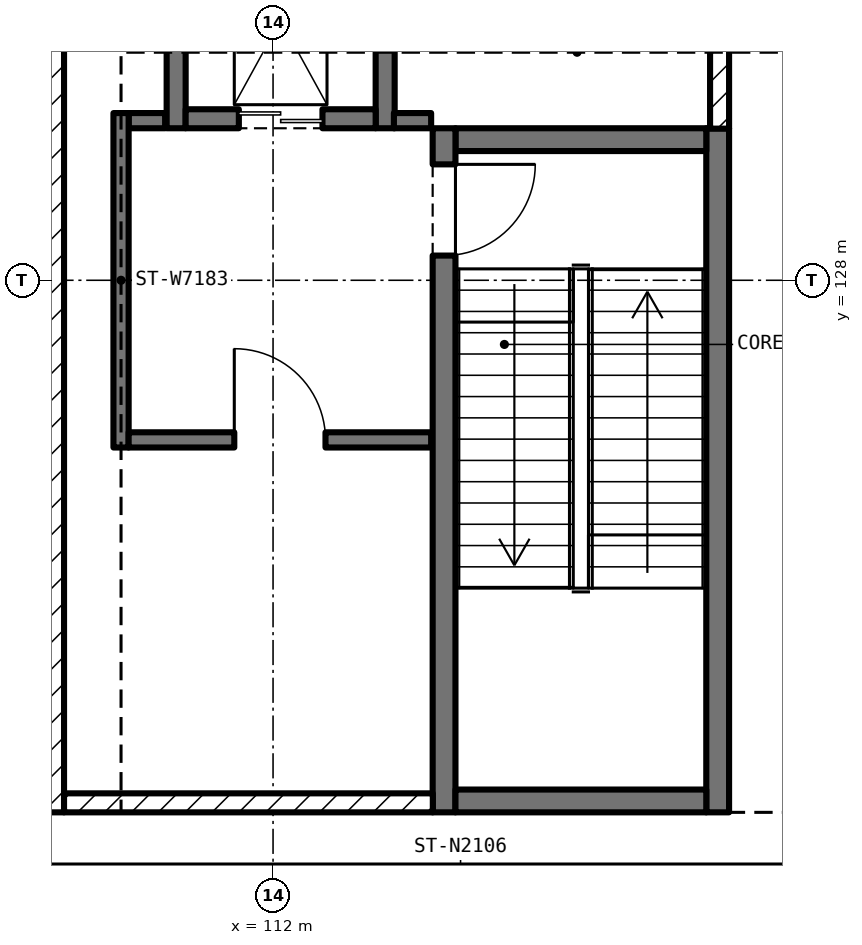
"""IFC4 building model, lengths in metres.
Left out: names, types, materials, properties, quantities, classifications, styles, units other than length and angle.
Written with IfcOpenShell. Run it as: python <this file> out.ifc"""

import sys

from ifc_helpers import new_model, si_unit, direction, frame, frame_2d, origin, place, context, subcontext, project, spatial, rectangle, extrude, element, fill, save


model = new_model("IFC4")
c1 = context("Model", 3, precision=1e-05, world=origin(), true_north=direction((0.0, 1.0)))
c2 = subcontext(c1, "Body", "Model", "MODEL_VIEW")
j1 = project(units=[si_unit("LENGTHUNIT", "METRE"), si_unit("PLANEANGLEUNIT", "RADIAN")], contexts=[c1])
p1 = place(None, origin())
s1 = spatial("IfcSite", under=j1, at=p1, CompositionType="ELEMENT")
p2 = place(p1, origin())
s2 = spatial("IfcBuilding", under=s1, at=p2, CompositionType="ELEMENT")
p3 = place(p2, frame((0.0, 0.0, 17.0)))
s3 = spatial("IfcBuildingStorey", under=s2, at=p3, CompositionType="ELEMENT", Elevation=17.0)
p4 = place(p3, frame((117.85, 121.0, 0.0), z_axis=(0.0, 0.0, 1.0), x_axis=(0.0, 1.0, 0.0)))
e1 = element("IfcWall", 1, at=p4, inside=s3, PredefinedType="SOLIDWALL", context=c2, shape_type="SweptSolid", body=[
    extrude(rectangle(XDim=9.0, YDim=0.3, at=frame_2d((4.5, 0.0))), origin(), (0.0, 0.0, 1.0), 5.5),
])
p5 = place(p3, frame((117.7, 129.85, 0.0), z_axis=(0.0, 0.0, 1.0), x_axis=(-1.0, 0.0, 0.0)))
e2 = element("IfcWall", 2, at=p5, inside=s3, PredefinedType="SOLIDWALL", context=c2, shape_type="SweptSolid", body=[
    extrude(rectangle(XDim=3.3, YDim=0.3, at=frame_2d((1.65, 0.0))), origin(), (0.0, 0.0, 1.0), 5.5),
])
p6 = place(p3, frame((114.25, 130.0, 0.0), z_axis=(0.0, 0.0, 1.0), x_axis=(0.0, -1.0, 0.0)))
e3 = element("IfcWall", 3, at=p6, inside=s3, PredefinedType="SOLIDWALL", context=c2, shape_type="SweptSolid", body=[
    extrude(rectangle(XDim=9.0, YDim=0.3, at=frame_2d((4.5, 0.0))), origin(), (0.0, 0.0, 1.0), 5.5),
])
p7 = place(p6, frame((0.475, 0.0, 0.0)))
e4 = element("IfcOpeningElement", 4, at=p7, cuts=e3, PredefinedType="OPENING", context=c2, shape_type="SweptSolid", body=[
    extrude(rectangle(XDim=1.2, YDim=2.1, at=frame_2d((0.6, 1.05))), frame((0.0, 0.162, 0.0), z_axis=(0.0, -1.0, 0.0), x_axis=(1.0, 0.0, 0.0)), (0.0, 0.0, 1.0), 0.324),
])
p8 = place(p3, frame((114.4, 121.15, 0.0), z_axis=(0.0, 0.0, 1.0), x_axis=(1.0, 0.0, 0.0)))
e5 = element("IfcWall", 5, at=p8, inside=s3, PredefinedType="SOLIDWALL", context=c2, shape_type="SweptSolid", body=[
    extrude(rectangle(XDim=3.3, YDim=0.3, at=frame_2d((1.65, 0.0))), origin(), (0.0, 0.0, 1.0), 5.5),
])
for number, where, z_axis, x_axis in (
    (6, (113.475, 130.0, 0.0), (0.0, 0.0, 1.0), (0.0, 1.0, 0.0)),
    (7, (110.725, 134.0, 0.0), (0.0, 0.0, 1.0), (0.0, -1.0, 0.0)),
):
    element("IfcWall", number, at=place(p3, frame(where, z_axis=z_axis, x_axis=x_axis)), inside=s3, PredefinedType="SOLIDWALL", context=c2, shape_type="SweptSolid", body=[
        extrude(rectangle(XDim=4.0, YDim=0.25, at=frame_2d((2.0, 0.0))), origin(), (0.0, 0.0, 1.0), 5.5),
    ])
p9 = place(p3, frame((110.85, 130.125, 0.0), z_axis=(0.0, 0.0, 1.0), x_axis=(1.0, 0.0, 0.0)))
e8 = element("IfcWall", 8, at=p9, inside=s3, PredefinedType="SOLIDWALL", context=c2, shape_type="SweptSolid", body=[
    extrude(rectangle(XDim=2.5, YDim=0.25, at=frame_2d((1.25, 0.0))), origin(), (0.0, 0.0, 1.0), 5.5),
])
p10 = place(p9, frame((0.7, 0.0, 0.0)))
e9 = element("IfcOpeningElement", 9, at=p10, cuts=e8, PredefinedType="OPENING", context=c2, shape_type="SweptSolid", body=[
    extrude(rectangle(XDim=1.1, YDim=2.1, at=frame_2d((0.55, 1.05))), frame((0.0, 0.137, 0.0), z_axis=(0.0, -1.0, 0.0), x_axis=(1.0, 0.0, 0.0)), (0.0, 0.0, 1.0), 0.274),
])
p11 = place(p3, frame((114.08, 130.1, 0.0), z_axis=(0.0, 0.0, 1.0), x_axis=(-1.0, 0.0, 0.0)))
e10 = element("IfcWall", 10, at=p11, inside=s3, PredefinedType="PARTITIONING", context=c2, shape_type="SweptSolid", body=[
    extrude(rectangle(XDim=0.49, YDim=0.2, at=frame_2d((0.245, 0.0))), origin(), (0.0, 0.0, 1.0), 5.28),
])
p12 = place(p3, frame((110.58, 130.1, 0.0), z_axis=(0.0, 0.0, 1.0), x_axis=(-1.0, 0.0, 0.0)))
e11 = element("IfcWall", 11, at=p12, inside=s3, PredefinedType="PARTITIONING", context=c2, shape_type="SweptSolid", body=[
    extrude(rectangle(XDim=0.48, YDim=0.2, at=frame_2d((0.24, 0.0))), origin(), (0.0, 0.0, 1.0), 5.28),
])
p13 = place(p3, frame((110.0, 130.2, 0.0), z_axis=(0.0, 0.0, 1.0), x_axis=(0.0, -1.0, 0.0)))
e12 = element("IfcWall", 12, at=p13, inside=s3, PredefinedType="PARTITIONING", context=c2, shape_type="SweptSolid", body=[
    extrude(rectangle(XDim=4.4, YDim=0.2, at=frame_2d((2.2, 0.0))), origin(), (0.0, 0.0, 1.0), 5.28),
])
p14 = place(p3, frame((110.1, 125.9, 0.0), z_axis=(0.0, 0.0, 1.0), x_axis=(1.0, 0.0, 0.0)))
e13 = element("IfcWall", 13, at=p14, inside=s3, PredefinedType="PARTITIONING", context=c2, shape_type="SweptSolid", body=[
    extrude(rectangle(XDim=3.98, YDim=0.2, at=frame_2d((1.99, 0.0))), origin(), (0.0, 0.0, 1.0), 5.28),
])
p15 = place(p14, frame((1.39, 0.0, 0.0)))
e14 = element("IfcOpeningElement", 14, at=p15, cuts=e13, PredefinedType="OPENING", context=c2, shape_type="SweptSolid", body=[
    extrude(rectangle(XDim=1.2, YDim=2.1, at=frame_2d((0.6, 1.05))), frame((0.0, 0.112, 0.0), z_axis=(0.0, -1.0, 0.0), x_axis=(1.0, 0.0, 0.0)), (0.0, 0.0, 1.0), 0.224),
])
p16 = place(p3, frame((117.875, 129.995, 0.0), z_axis=(0.0, 0.0, 1.0), x_axis=(0.0, 1.0, 0.0)))
e15 = element("IfcWall", 15, at=p16, inside=s3, PredefinedType="SOLIDWALL", context=c2, shape_type="SweptSolid", body=[
    extrude(rectangle(XDim=5.005, YDim=0.25, at=frame_2d((2.502, 0.0))), origin(), (0.0, 0.0, 1.0), 5.28),
])
p17 = place(p16, frame((1.43, 0.0, 2.6)))
e16 = element("IfcOpeningElement", 16, at=p17, cuts=e15, PredefinedType="OPENING", context=c2, shape_type="SweptSolid", body=[
    extrude(rectangle(XDim=2.4, YDim=1.2, at=frame_2d((1.2, 0.6))), frame((0.0, 0.137, 0.0), z_axis=(0.0, -1.0, 0.0), x_axis=(1.0, 0.0, 0.0)), (0.0, 0.0, 1.0), 0.274),
])
p18 = place(p3, frame((109.125, 134.75, 0.0), z_axis=(0.0, 0.0, 1.0), x_axis=(0.0, -1.0, 0.0)))
e17 = element("IfcWall", 17, at=p18, inside=s3, PredefinedType="SOLIDWALL", context=c2, shape_type="SweptSolid", body=[
    extrude(rectangle(XDim=13.75, YDim=0.25, at=frame_2d((6.875, 0.0))), origin(), (0.0, 0.0, 1.0), 5.28),
])
p19 = place(p3, frame((109.25, 121.125, 0.0), z_axis=(0.0, 0.0, 1.0), x_axis=(1.0, 0.0, 0.0)))
e18 = element("IfcWall", 18, at=p19, inside=s3, PredefinedType="SOLIDWALL", context=c2, shape_type="SweptSolid", body=[
    extrude(rectangle(XDim=4.852, YDim=0.25, at=frame_2d((2.426, 0.0))), origin(), (0.0, 0.0, 1.0), 5.28),
])
p20 = place(p7, origin())
e19 = element("IfcDoor", 19, at=p20, inside=s3, OperationType="SINGLE_SWING_LEFT", PredefinedType="DOOR", context=c2, shape_type="SweptSolid", body=[
    extrude(rectangle(XDim=1.2, YDim=2.1, at=frame_2d((0.6, 1.05))), frame((0.0, 0.025, 0.0), z_axis=(0.0, -1.0, 0.0), x_axis=(1.0, 0.0, 0.0)), (0.0, 0.0, 1.0), 0.05),
])
fill(e4, e19)
p21 = place(p10, origin())
e20 = element("IfcDoor", 20, at=p21, inside=s3, OperationType="DOUBLE_DOOR_SLIDING", PredefinedType="DOOR", context=c2, shape_type="SweptSolid", body=[
    extrude(rectangle(XDim=1.1, YDim=2.1, at=frame_2d((0.55, 1.05))), frame((0.0, 0.025, 0.0), z_axis=(0.0, -1.0, 0.0), x_axis=(1.0, 0.0, 0.0)), (0.0, 0.0, 1.0), 0.05),
])
fill(e9, e20)
p22 = place(p15, origin())
e21 = element("IfcDoor", 21, at=p22, inside=s3, OperationType="SINGLE_SWING_LEFT", PredefinedType="DOOR", context=c2, shape_type="SweptSolid", body=[
    extrude(rectangle(XDim=1.2, YDim=2.1, at=frame_2d((0.6, 1.05))), frame((0.0, 0.025, 0.0), z_axis=(0.0, -1.0, 0.0), x_axis=(1.0, 0.0, 0.0)), (0.0, 0.0, 1.0), 0.05),
])
fill(e14, e21)
save(model, sys.argv[1])
